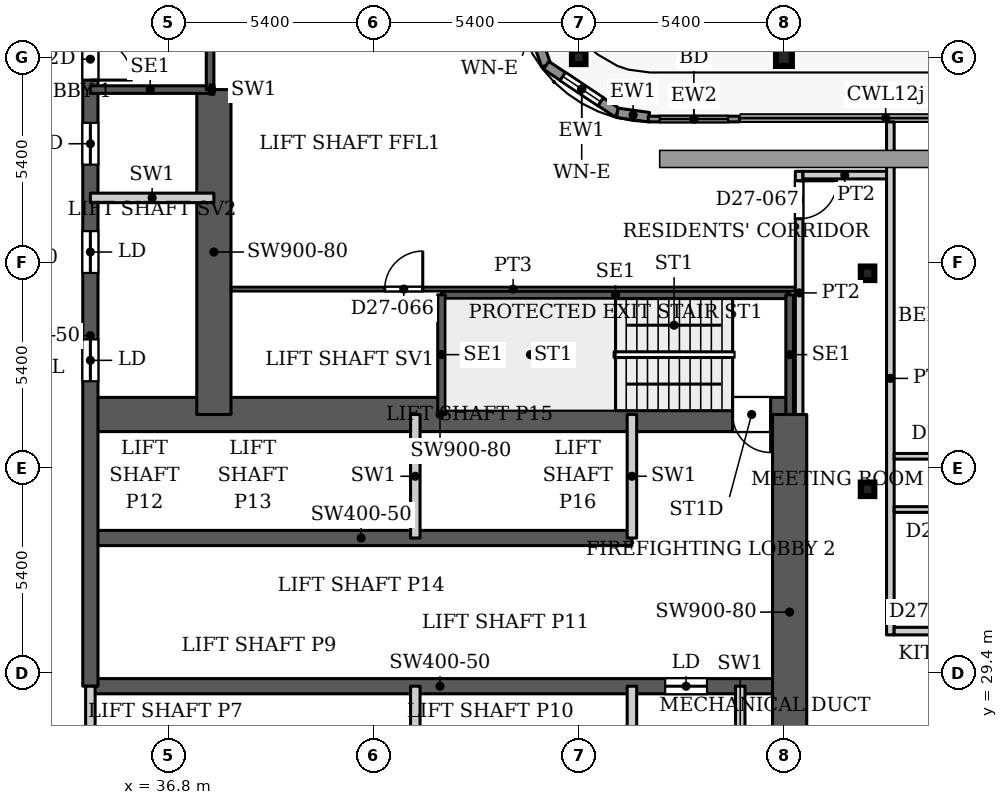
"""IFC4 building model, lengths in metres.
Left out: names, types, materials, properties, quantities, classifications, styles, units other than length and angle.
Written with IfcOpenShell. Run it as: python <this file> out.ifc"""

import sys

from ifc_helpers import new_model, si_unit, direction, frame, frame_2d, origin, origin_2d, place, context, subcontext, project, spatial, rectangle, hollow_rectangle, i_section, extrude, source, transform, mapped, element, fill, save


model = new_model("IFC4")
c1 = context("Model", 3, precision=1e-05, world=origin(), true_north=direction((0.0, 1.0)))
c2 = subcontext(c1, "Body", "Model", "MODEL_VIEW")
j1 = project(units=[si_unit("LENGTHUNIT", "METRE"), si_unit("PLANEANGLEUNIT", "RADIAN")], contexts=[c1])
p1 = place(None, origin())
s1 = spatial("IfcSite", under=j1, at=p1, CompositionType="ELEMENT")
p2 = place(p1, origin())
s2 = spatial("IfcBuilding", under=s1, at=p2, CompositionType="ELEMENT")
p3 = place(p2, frame((0.0, 0.0, 121.4)))
s3 = spatial("IfcBuildingStorey", under=s2, at=p3, CompositionType="ELEMENT", Elevation=121.4)
p4 = place(p3, frame((53.0, 45.6, 0.0), z_axis=(0.0, 0.0, 1.0), x_axis=(1.0, 0.0, 0.0)))
e1 = element("IfcColumn", 1, at=p4, inside=s3, PredefinedType="COLUMN", context=c2, shape_type="SweptSolid", body=[
    extrude(i_section(OverallWidth=0.418, OverallDepth=0.455, WebThickness=0.042, FlangeThickness=0.068, FilletRadius=0.014, at=origin_2d()), origin(), (0.0, 0.0, 1.0), 3.9),
])
for number, where, z_axis, x_axis in (
    (2, (55.2, 34.232, 0.0), (0.0, 0.0, 1.0), (1.0, 0.0, 0.0)),
    (3, (55.2, 39.916, 0.0), (0.0, 0.0, 1.0), (1.0, 0.0, 0.0)),
    (4, (47.6, 45.6, 0.0), (0.0, 0.0, 1.0), (1.0, 0.0, 0.0)),
):
    element("IfcColumn", number, at=place(p3, frame(where, z_axis=z_axis, x_axis=x_axis)), inside=s3, PredefinedType="COLUMN", context=c2, shape_type="SweptSolid", body=[
        extrude(hollow_rectangle(XDim=0.356, YDim=0.356, WallThickness=0.016, InnerFilletRadius=0.016, OuterFilletRadius=0.032, at=origin_2d()), origin(), (0.0, 0.0, 1.0), 3.9),
    ])
p5 = place(p3, frame((34.75, 29.05, 0.0), z_axis=(0.0, 0.0, 1.0), x_axis=(1.0, 0.0, 0.0)))
e5 = element("IfcWall", 5, at=p5, inside=s3, PredefinedType="SHEAR", context=c2, shape_type="SweptSolid", body=[
    extrude(rectangle(XDim=18.4, YDim=0.4, at=frame_2d((9.2, 0.0))), origin(), (0.0, 0.0, 1.0), 3.9),
])
p6 = place(p5, frame((15.125, 0.0, 0.0)))
e6 = element("IfcOpeningElement", 6, at=p6, cuts=e5, PredefinedType="OPENING", context=c2, shape_type="SweptSolid", body=[
    extrude(rectangle(XDim=1.1, YDim=2.2, at=frame_2d((0.55, 1.1))), frame((0.0, 0.21, 0.0), z_axis=(0.0, -1.0, 0.0), x_axis=(1.0, 0.0, 0.0)), (0.0, 0.0, 1.0), 0.42),
])
p7 = place(p3, frame((34.75, 32.95, 0.0), z_axis=(0.0, 0.0, 1.0), x_axis=(1.0, 0.0, 0.0)))
e7 = element("IfcWall", 7, at=p7, inside=s3, PredefinedType="SHEAR", context=c2, shape_type="SweptSolid", body=[
    extrude(rectangle(XDim=14.25, YDim=0.4, at=frame_2d((7.125, 0.0))), origin(), (0.0, 0.0, 1.0), 3.9),
])
p8 = place(p3, frame((34.75, 36.2, 0.0), z_axis=(0.0, 0.0, 1.0), x_axis=(1.0, 0.0, 0.0)))
e8 = element("IfcWall", 8, at=p8, inside=s3, PredefinedType="SHEAR", context=c2, shape_type="SweptSolid", body=[
    extrude(rectangle(XDim=18.4, YDim=0.9, at=frame_2d((9.2, 0.0))), origin(), (0.0, 0.0, 1.0), 3.9),
])
p9 = place(p8, frame((16.9, 0.0, 0.0)))
e9 = element("IfcOpeningElement", 9, at=p9, cuts=e8, PredefinedType="OPENING", context=c2, shape_type="SweptSolid", body=[
    extrude(rectangle(XDim=1.0, YDim=2.2, at=frame_2d((0.5, 1.1))), frame((0.0, 0.46, 0.0), z_axis=(0.0, -1.0, 0.0), x_axis=(1.0, 0.0, 0.0)), (0.0, 0.0, 1.0), 0.92),
])
p10 = place(p3, frame((34.75, 29.05, 0.0), z_axis=(0.0, 0.0, 1.0), x_axis=(0.0, 1.0, 0.0)))
e10 = element("IfcWall", 10, at=p10, inside=s3, PredefinedType="SHEAR", context=c2, shape_type="SweptSolid", body=[
    extrude(rectangle(XDim=18.45, YDim=0.4, at=frame_2d((9.225, 0.0))), origin(), (0.0, 0.0, 1.0), 3.9),
])
p11 = place(p10, frame((8.025, 0.0, 0.0)))
e11 = element("IfcOpeningElement", 11, at=p11, cuts=e10, PredefinedType="OPENING", context=c2, shape_type="SweptSolid", body=[
    extrude(rectangle(XDim=1.1, YDim=2.2, at=frame_2d((0.55, 1.1))), frame((0.0, 0.21, 0.0), z_axis=(0.0, -1.0, 0.0), x_axis=(1.0, 0.0, 0.0)), (0.0, 0.0, 1.0), 0.42),
])
p12 = place(p10, frame((10.875, 0.0, 0.0)))
e12 = element("IfcOpeningElement", 12, at=p12, cuts=e10, PredefinedType="OPENING", context=c2, shape_type="SweptSolid", body=[
    extrude(rectangle(XDim=1.1, YDim=2.2, at=frame_2d((0.55, 1.1))), frame((0.0, 0.21, 0.0), z_axis=(0.0, -1.0, 0.0), x_axis=(1.0, 0.0, 0.0)), (0.0, 0.0, 1.0), 0.42),
])
p13 = place(p10, frame((13.725, 0.0, 0.0)))
e13 = element("IfcOpeningElement", 13, at=p13, cuts=e10, PredefinedType="OPENING", context=c2, shape_type="SweptSolid", body=[
    extrude(rectangle(XDim=1.1, YDim=2.2, at=frame_2d((0.55, 1.1))), frame((0.0, 0.21, 0.0), z_axis=(0.0, -1.0, 0.0), x_axis=(1.0, 0.0, 0.0)), (0.0, 0.0, 1.0), 0.42),
])
p14 = place(p10, frame((15.95, 0.0, 0.0)))
e14 = element("IfcOpeningElement", 14, at=p14, cuts=e10, PredefinedType="OPENING", context=c2, shape_type="SweptSolid", body=[
    extrude(rectangle(XDim=1.1, YDim=2.2, at=frame_2d((0.55, 1.1))), frame((0.0, 0.21, 0.0), z_axis=(0.0, -1.0, 0.0), x_axis=(1.0, 0.0, 0.0)), (0.0, 0.0, 1.0), 0.42),
])
p15 = place(p3, frame((38.0, 36.2, 0.0), z_axis=(0.0, 0.0, 1.0), x_axis=(0.0, 1.0, 0.0)))
e15 = element("IfcWall", 15, at=p15, inside=s3, PredefinedType="SHEAR", context=c2, shape_type="SweptSolid", body=[
    extrude(rectangle(XDim=8.55, YDim=0.9, at=frame_2d((4.275, 0.0))), origin(), (0.0, 0.0, 1.0), 3.9),
])
p16 = place(p3, frame((53.15, 25.8, 0.0), z_axis=(0.0, 0.0, 1.0), x_axis=(0.0, 1.0, 0.0)))
e16 = element("IfcWall", 16, at=p16, inside=s3, PredefinedType="SHEAR", context=c2, shape_type="SweptSolid", body=[
    extrude(rectangle(XDim=10.4, YDim=0.9, at=frame_2d((5.2, 0.0))), origin(), (0.0, 0.0, 1.0), 3.9),
])
p17 = place(p3, frame((46.018, 47.471, 0.0), z_axis=(0.0, 0.0, 1.0), x_axis=(0.328791208903, -0.944402637093, 0.0)))
e17 = element("IfcWall", 17, at=p17, inside=s3, PredefinedType="SOLIDWALL", context=c2, shape_type="SweptSolid", body=[
    extrude(rectangle(XDim=2.205, YDim=0.25, at=frame_2d((1.102, 0.0))), origin(), (0.0, 0.0, 1.0), 3.75),
])
p18 = place(p17, frame((0.503, 0.0, 0.6)))
e18 = element("IfcOpeningElement", 18, at=p18, cuts=e17, PredefinedType="OPENING", context=c2, shape_type="SweptSolid", body=[
    extrude(rectangle(XDim=1.2, YDim=2.1, at=frame_2d((0.6, 1.05))), frame((0.0, 0.135, 0.0), z_axis=(0.0, -1.0, 0.0), x_axis=(1.0, 0.0, 0.0)), (0.0, 0.0, 1.0), 0.27),
])
p19 = place(p3, frame((46.743, 45.389, 0.0), z_axis=(0.0, 0.0, 1.0), x_axis=(0.831449265529, -0.555600682912, 0.0)))
e19 = element("IfcWall", 19, at=p19, inside=s3, PredefinedType="SOLIDWALL", context=c2, shape_type="SweptSolid", body=[
    extrude(rectangle(XDim=2.251, YDim=0.25, at=frame_2d((1.126, 0.0))), origin(), (0.0, 0.0, 1.0), 3.75),
])
p20 = place(p19, frame((0.525, 0.0, 0.6)))
e20 = element("IfcOpeningElement", 20, at=p20, cuts=e19, PredefinedType="OPENING", context=c2, shape_type="SweptSolid", body=[
    extrude(rectangle(XDim=1.2, YDim=2.1, at=frame_2d((0.6, 1.05))), frame((0.0, 0.135, 0.0), z_axis=(0.0, -1.0, 0.0), x_axis=(1.0, 0.0, 0.0)), (0.0, 0.0, 1.0), 0.27),
])
p21 = place(p3, frame((48.615, 44.138, 0.0), z_axis=(0.0, 0.0, 1.0), x_axis=(0.990741504246, -0.135761819977, 0.0)))
e21 = element("IfcWall", 21, at=p21, inside=s3, PredefinedType="SOLIDWALL", context=c2, shape_type="SweptSolid", body=[
    extrude(rectangle(XDim=0.84, YDim=0.25, at=frame_2d((0.42, 0.0))), origin(), (0.0, 0.0, 1.0), 3.75),
])
p22 = place(p3, frame((49.43, 43.975, 0.0), z_axis=(0.0, 0.0, 1.0), x_axis=(1.0, 0.0, 0.0)))
e22 = element("IfcWall", 22, at=p22, inside=s3, PredefinedType="SOLIDWALL", context=c2, shape_type="SweptSolid", body=[
    extrude(rectangle(XDim=2.4, YDim=0.15, at=frame_2d((1.2, 0.0))), origin(), (0.0, 0.0, 1.0), 3.75),
])
p23 = place(p22, frame((0.3, 0.0, 0.0)))
e23 = element("IfcOpeningElement", 23, at=p23, cuts=e22, PredefinedType="OPENING", context=c2, shape_type="SweptSolid", body=[
    extrude(rectangle(XDim=1.8, YDim=2.4, at=frame_2d((0.9, 1.2))), frame((0.0, 0.085, 0.0), z_axis=(0.0, -1.0, 0.0), x_axis=(1.0, 0.0, 0.0)), (0.0, 0.0, 1.0), 0.17),
])
p24 = place(p3, frame((43.99, 39.35, 0.0), z_axis=(0.0, 0.0, 1.0), x_axis=(1.0, 0.0, 0.0)))
e24 = element("IfcWall", 24, at=p24, inside=s3, PredefinedType="SHEAR", context=c2, shape_type="SweptSolid", body=[
    extrude(rectangle(XDim=9.16, YDim=0.2, at=frame_2d((4.58, 0.0))), origin(), (0.0, 0.0, 1.0), 3.9),
])
for number, where, z_axis, x_axis in (
    (25, (43.99, 36.2, 0.0), (0.0, 0.0, 1.0), (0.0, 1.0, 0.0)),
    (26, (53.15, 36.2, 0.0), (0.0, 0.0, 1.0), (0.0, 1.0, 0.0)),
):
    element("IfcWall", number, at=place(p3, frame(where, z_axis=z_axis, x_axis=x_axis)), inside=s3, PredefinedType="SHEAR", context=c2, shape_type="SweptSolid", body=[
        extrude(rectangle(XDim=3.15, YDim=0.2, at=frame_2d((1.575, 0.0))), origin(), (0.0, 0.0, 1.0), 3.9),
    ])
p25 = place(p3, frame((34.75, 44.75, 0.0), z_axis=(0.0, 0.0, 1.0), x_axis=(1.0, 0.0, 0.0)))
e27 = element("IfcWall", 27, at=p25, inside=s3, PredefinedType="SHEAR", context=c2, shape_type="SweptSolid", body=[
    extrude(rectangle(XDim=3.15, YDim=0.2, at=frame_2d((1.575, 0.0))), origin(), (0.0, 0.0, 1.0), 3.9),
])
p26 = place(p3, frame((37.9, 44.75, 0.0), z_axis=(0.0, 0.0, 1.0), x_axis=(0.0, 1.0, 0.0)))
e28 = element("IfcWall", 28, at=p26, inside=s3, PredefinedType="SHEAR", context=c2, shape_type="SweptSolid", body=[
    extrude(rectangle(XDim=9.16, YDim=0.2, at=frame_2d((4.58, 0.0))), origin(), (0.0, 0.0, 1.0), 3.9),
])
for number, where, z_axis, x_axis in (
    (29, (34.75, 25.8, 0.0), (0.0, 0.0, 1.0), (0.0, 1.0, 0.0)),
    (30, (43.3, 25.8, 0.0), (0.0, 0.0, 1.0), (0.0, 1.0, 0.0)),
    (31, (43.3, 32.95, 0.0), (0.0, 0.0, 1.0), (0.0, 1.0, 0.0)),
    (32, (49.0, 25.8, 0.0), (0.0, 0.0, 1.0), (0.0, 1.0, 0.0)),
    (33, (49.0, 32.95, 0.0), (0.0, 0.0, 1.0), (0.0, 1.0, 0.0)),
    (34, (51.85, 25.8, 0.0), (0.0, 0.0, 1.0), (0.0, 1.0, 0.0)),
    (35, (34.75, 41.9, 0.0), (0.0, 0.0, 1.0), (1.0, 0.0, 0.0)),
):
    element("IfcWall", number, at=place(p3, frame(where, z_axis=z_axis, x_axis=x_axis)), inside=s3, PredefinedType="PARTITIONING", context=c2, shape_type="SweptSolid", body=[
        extrude(rectangle(XDim=3.25, YDim=0.25, at=frame_2d((1.625, 0.0))), origin(), (0.0, 0.0, 1.0), 3.9),
    ])
p27 = place(p3, frame((37.9, 44.75, 0.0), z_axis=(0.0, 0.0, 1.0), x_axis=(1.0, 0.0, 0.0)))
e36 = element("IfcWall", 36, at=p27, inside=s3, PredefinedType="PARTITIONING", context=c2, shape_type="SweptSolid", body=[
    extrude(rectangle(XDim=0.1, YDim=0.25, at=frame_2d((0.05, 0.0))), origin(), (0.0, 0.0, 1.0), 3.9),
])
p28 = place(p3, frame((38.449, 39.5, 0.0), z_axis=(0.0, 0.0, 1.0), x_axis=(1.0, 0.0, 0.0)))
e37 = element("IfcWall", 37, at=p28, inside=s3, PredefinedType="PARTITIONING", context=c2, shape_type="SweptSolid", body=[
    extrude(rectangle(XDim=14.851, YDim=0.1, at=frame_2d((7.426, 0.0))), origin(), (0.0, 0.0, 1.0), 3.6),
])
p29 = place(p28, frame((4.047, 0.0, 0.0)))
e38 = element("IfcOpeningElement", 38, at=p29, cuts=e37, PredefinedType="OPENING", context=c2, shape_type="SweptSolid", body=[
    extrude(rectangle(XDim=1.0, YDim=2.1, at=frame_2d((0.5, 1.05))), frame((0.0, 0.06, 0.0), z_axis=(0.0, -1.0, 0.0), x_axis=(1.0, 0.0, 0.0)), (0.0, 0.0, 1.0), 0.12),
])
p30 = place(p3, frame((53.4, 36.199, 0.0), z_axis=(0.0, 0.0, 1.0), x_axis=(0.0, 1.0, 0.0)))
e39 = element("IfcWall", 39, at=p30, inside=s3, PredefinedType="PARTITIONING", context=c2, shape_type="SweptSolid", body=[
    extrude(rectangle(XDim=6.401, YDim=0.2, at=frame_2d((3.201, 0.0))), origin(), (0.0, 0.0, 1.0), 3.6),
])
p31 = place(p30, frame((5.151, 0.0, 0.0)))
e40 = element("IfcOpeningElement", 40, at=p31, cuts=e39, PredefinedType="OPENING", context=c2, shape_type="SweptSolid", body=[
    extrude(rectangle(XDim=1.0, YDim=2.1, at=frame_2d((0.5, 1.05))), frame((0.0, 0.11, 0.0), z_axis=(0.0, -1.0, 0.0), x_axis=(1.0, 0.0, 0.0)), (0.0, 0.0, 1.0), 0.22),
])
p32 = place(p3, frame((53.5, 42.5, 0.0), z_axis=(0.0, 0.0, 1.0), x_axis=(1.0, 0.0, 0.0)))
e41 = element("IfcWall", 41, at=p32, inside=s3, PredefinedType="PARTITIONING", context=c2, shape_type="SweptSolid", body=[
    extrude(rectangle(XDim=2.2, YDim=0.2, at=frame_2d((1.1, 0.0))), origin(), (0.0, 0.0, 1.0), 3.6),
])
p33 = place(p3, frame((55.8, 30.4, 0.0), z_axis=(0.0, 0.0, 1.0), x_axis=(0.0, 1.0, 0.0)))
e42 = element("IfcWall", 42, at=p33, inside=s3, PredefinedType="PARTITIONING", context=c2, shape_type="SweptSolid", body=[
    extrude(rectangle(XDim=13.5, YDim=0.2, at=frame_2d((6.75, 0.0))), origin(), (0.0, 0.0, 1.0), 3.6),
])
p34 = place(p3, frame((55.9, 30.5, 0.0), z_axis=(0.0, 0.0, 1.0), x_axis=(1.0, 0.0, 0.0)))
e43 = element("IfcWall", 43, at=p34, inside=s3, PredefinedType="PARTITIONING", context=c2, shape_type="SweptSolid", body=[
    extrude(rectangle(XDim=42.2, YDim=0.2, at=frame_2d((21.1, 0.0))), origin(), (0.0, 0.0, 1.0), 3.6),
])
p35 = place(p34, frame((4.8, 0.0, 0.0)))
e44 = element("IfcOpeningElement", 44, at=p35, cuts=e43, PredefinedType="OPENING", context=c2, shape_type="SweptSolid", body=[
    extrude(rectangle(XDim=1.0, YDim=2.1, at=frame_2d((0.5, 1.05))), frame((0.0, 0.11, 0.0), z_axis=(0.0, -1.0, 0.0), x_axis=(1.0, 0.0, 0.0)), (0.0, 0.0, 1.0), 0.22),
])
p36 = place(p34, frame((11.1, 0.0, 0.0)))
e45 = element("IfcOpeningElement", 45, at=p36, cuts=e43, PredefinedType="OPENING", context=c2, shape_type="SweptSolid", body=[
    extrude(rectangle(XDim=1.0, YDim=2.1, at=frame_2d((0.5, 1.05))), frame((0.0, 0.11, 0.0), z_axis=(0.0, -1.0, 0.0), x_axis=(1.0, 0.0, 0.0)), (0.0, 0.0, 1.0), 0.22),
])
p37 = place(p34, frame((39.0, 0.0, 0.0)))
e46 = element("IfcOpeningElement", 46, at=p37, cuts=e43, PredefinedType="OPENING", context=c2, shape_type="SweptSolid", body=[
    extrude(rectangle(XDim=1.0, YDim=2.1, at=frame_2d((0.5, 1.05))), frame((0.0, 0.11, 0.0), z_axis=(0.0, -1.0, 0.0), x_axis=(1.0, 0.0, 0.0)), (0.0, 0.0, 1.0), 0.22),
])
p38 = place(p3, frame((55.9, 33.7, 0.0), z_axis=(0.0, 0.0, 1.0), x_axis=(1.0, 0.0, 0.0)))
e47 = element("IfcWall", 47, at=p38, inside=s3, PredefinedType="PARTITIONING", context=c2, shape_type="SweptSolid", body=[
    extrude(rectangle(XDim=4.475, YDim=0.15, at=frame_2d((2.238, 0.0))), origin(), (0.0, 0.0, 1.0), 3.6),
])
p39 = place(p38, frame((0.95, 0.0, 0.0)))
e48 = element("IfcOpeningElement", 48, at=p39, cuts=e47, PredefinedType="OPENING", context=c2, shape_type="SweptSolid", body=[
    extrude(rectangle(XDim=0.9, YDim=2.1, at=frame_2d((0.45, 1.05))), frame((0.0, 0.085, 0.0), z_axis=(0.0, -1.0, 0.0), x_axis=(1.0, 0.0, 0.0)), (0.0, 0.0, 1.0), 0.17),
])
p40 = place(p38, frame((3.25, 0.0, 0.0)))
e49 = element("IfcOpeningElement", 49, at=p40, cuts=e47, PredefinedType="OPENING", context=c2, shape_type="SweptSolid", body=[
    extrude(rectangle(XDim=0.8, YDim=2.1, at=frame_2d((0.4, 1.05))), frame((0.0, 0.085, 0.0), z_axis=(0.0, -1.0, 0.0), x_axis=(1.0, 0.0, 0.0)), (0.0, 0.0, 1.0), 0.17),
])
p41 = place(p3, frame((55.9, 35.1, 0.0), z_axis=(0.0, 0.0, 1.0), x_axis=(1.0, 0.0, 0.0)))
e50 = element("IfcWall", 50, at=p41, inside=s3, PredefinedType="PARTITIONING", context=c2, shape_type="SweptSolid", body=[
    extrude(rectangle(XDim=10.6, YDim=0.15, at=frame_2d((5.3, 0.0))), origin(), (0.0, 0.0, 1.0), 3.6),
])
p42 = place(p41, frame((1.1, 0.0, 0.0)))
e51 = element("IfcOpeningElement", 51, at=p42, cuts=e50, PredefinedType="OPENING", context=c2, shape_type="SweptSolid", body=[
    extrude(rectangle(XDim=0.9, YDim=2.1, at=frame_2d((0.45, 1.05))), frame((0.0, 0.085, 0.0), z_axis=(0.0, -1.0, 0.0), x_axis=(1.0, 0.0, 0.0)), (0.0, 0.0, 1.0), 0.17),
])
p43 = place(p41, frame((8.25, 0.0, 0.0)))
e52 = element("IfcOpeningElement", 52, at=p43, cuts=e50, PredefinedType="OPENING", context=c2, shape_type="SweptSolid", body=[
    extrude(rectangle(XDim=1.0, YDim=2.1, at=frame_2d((0.5, 1.05))), frame((0.0, 0.085, 0.0), z_axis=(0.0, -1.0, 0.0), x_axis=(1.0, 0.0, 0.0)), (0.0, 0.0, 1.0), 0.17),
])
p44 = place(p41, frame((5.6, 0.0, 0.0)))
e53 = element("IfcOpeningElement", 53, at=p44, cuts=e50, PredefinedType="OPENING", context=c2, shape_type="SweptSolid", body=[
    extrude(rectangle(XDim=0.9, YDim=2.1, at=frame_2d((0.45, 1.05))), frame((0.0, 0.085, 0.0), z_axis=(0.0, -1.0, 0.0), x_axis=(1.0, 0.0, 0.0)), (0.0, 0.0, 1.0), 0.17),
])
m1 = source(origin(), c2, "Body", "SweptSolid", [
    extrude(rectangle(XDim=1.2, YDim=2.1, at=frame_2d((0.6, 1.05))), frame((0.0, 0.03, 0.0), z_axis=(0.0, -1.0, 0.0), x_axis=(1.0, 0.0, 0.0)), (0.0, 0.0, 1.0), 0.06),
])
p45 = place(p20, origin())
e54 = element("IfcWindow", 54, at=p45, inside=s3, PartitioningType="SINGLE_PANEL", PredefinedType="WINDOW", context=c2, shape_type="MappedRepresentation", body=[
    mapped(m1, transform((0.0, 0.0, 0.0), x_axis=(1.0, 0.0, 0.0), y_axis=(0.0, 1.0, 0.0), z_axis=(0.0, 0.0, 1.0), scale=1.0)),
])
fill(e20, e54)
m2 = source(origin(), c2, "Body", "SweptSolid", [
    extrude(rectangle(XDim=1.8, YDim=2.4, at=frame_2d((0.9, 1.2))), frame((0.0, 0.025, 0.0), z_axis=(0.0, -1.0, 0.0), x_axis=(1.0, 0.0, 0.0)), (0.0, 0.0, 1.0), 0.05),
])
p46 = place(p23, origin())
e55 = element("IfcDoor", 55, at=p46, inside=s3, OperationType="SLIDING_TO_LEFT", PredefinedType="DOOR", context=c2, shape_type="MappedRepresentation", body=[
    mapped(m2, transform((0.0, 0.0, 0.0), x_axis=(1.0, 0.0, 0.0), y_axis=(0.0, 1.0, 0.0), z_axis=(0.0, 0.0, 1.0), scale=1.0)),
])
fill(e23, e55)
m3 = source(origin(), c2, "Body", "SweptSolid", [
    extrude(rectangle(XDim=1.1, YDim=2.2, at=frame_2d((0.55, 1.1))), frame((0.0, 0.025, 0.0), z_axis=(0.0, -1.0, 0.0), x_axis=(1.0, 0.0, 0.0)), (0.0, 0.0, 1.0), 0.05),
])
p47 = place(p11, origin())
e56 = element("IfcDoor", 56, at=p47, inside=s3, OperationType="SLIDING_TO_LEFT", PredefinedType="DOOR", context=c2, shape_type="MappedRepresentation", body=[
    mapped(m3, transform((0.0, 0.0, 0.0), x_axis=(1.0, 0.0, 0.0), y_axis=(0.0, 1.0, 0.0), z_axis=(0.0, 0.0, 1.0), scale=1.0)),
])
fill(e11, e56)
p48 = place(p12, origin())
e57 = element("IfcDoor", 57, at=p48, inside=s3, OperationType="SLIDING_TO_LEFT", PredefinedType="DOOR", context=c2, shape_type="MappedRepresentation", body=[
    mapped(m3, transform((0.0, 0.0, 0.0), x_axis=(1.0, 0.0, 0.0), y_axis=(0.0, 1.0, 0.0), z_axis=(0.0, 0.0, 1.0), scale=1.0)),
])
fill(e12, e57)
p49 = place(p13, origin())
e58 = element("IfcDoor", 58, at=p49, inside=s3, OperationType="SLIDING_TO_LEFT", PredefinedType="DOOR", context=c2, shape_type="MappedRepresentation", body=[
    mapped(m3, transform((0.0, 0.0, 0.0), x_axis=(1.0, 0.0, 0.0), y_axis=(0.0, 1.0, 0.0), z_axis=(0.0, 0.0, 1.0), scale=1.0)),
])
fill(e13, e58)
p50 = place(p6, origin())
e59 = element("IfcDoor", 59, at=p50, inside=s3, OperationType="SLIDING_TO_LEFT", PredefinedType="DOOR", context=c2, shape_type="MappedRepresentation", body=[
    mapped(m3, transform((0.0, 0.0, 0.0), x_axis=(1.0, 0.0, 0.0), y_axis=(0.0, 1.0, 0.0), z_axis=(0.0, 0.0, 1.0), scale=1.0)),
])
fill(e6, e59)
m4 = source(origin(), c2, "Body", "SweptSolid", [
    extrude(rectangle(XDim=1.0, YDim=2.2, at=frame_2d((0.5, 1.1))), frame((0.0, 0.025, 0.0), z_axis=(0.0, -1.0, 0.0), x_axis=(1.0, 0.0, 0.0)), (0.0, 0.0, 1.0), 0.05),
])
p51 = place(p9, origin())
e60 = element("IfcDoor", 60, at=p51, inside=s3, OperationType="SINGLE_SWING_RIGHT", PredefinedType="DOOR", context=c2, shape_type="MappedRepresentation", body=[
    mapped(m4, transform((0.0, 0.0, 0.0), x_axis=(1.0, 0.0, 0.0), y_axis=(0.0, 1.0, 0.0), z_axis=(0.0, 0.0, 1.0), scale=1.0)),
])
fill(e9, e60)
m5 = source(origin(), c2, "Body", "SweptSolid", [
    extrude(rectangle(XDim=1.1, YDim=2.2, at=frame_2d((0.55, 1.1))), frame((0.0, 0.025, 0.0), z_axis=(0.0, -1.0, 0.0), x_axis=(1.0, 0.0, 0.0)), (0.0, 0.0, 1.0), 0.05),
])
p52 = place(p14, origin())
e61 = element("IfcDoor", 61, at=p52, inside=s3, OperationType="SINGLE_SWING_RIGHT", PredefinedType="DOOR", context=c2, shape_type="MappedRepresentation", body=[
    mapped(m5, transform((0.0, 0.0, 0.0), x_axis=(1.0, 0.0, 0.0), y_axis=(0.0, 1.0, 0.0), z_axis=(0.0, 0.0, 1.0), scale=1.0)),
])
fill(e14, e61)
m6 = source(origin(), c2, "Body", "SweptSolid", [
    extrude(rectangle(XDim=1.0, YDim=2.1, at=frame_2d((0.5, 1.05))), frame((0.0, 0.025, 0.0), z_axis=(0.0, -1.0, 0.0), x_axis=(1.0, 0.0, 0.0)), (0.0, 0.0, 1.0), 0.05),
])
p53 = place(p29, origin())
e62 = element("IfcDoor", 62, at=p53, inside=s3, OperationType="SINGLE_SWING_LEFT", PredefinedType="DOOR", context=c2, shape_type="MappedRepresentation", body=[
    mapped(m6, transform((0.0, 0.0, 0.0), x_axis=(1.0, 0.0, 0.0), y_axis=(0.0, 1.0, 0.0), z_axis=(0.0, 0.0, 1.0), scale=1.0)),
])
fill(e38, e62)
m7 = source(origin(), c2, "Body", "SweptSolid", [
    extrude(rectangle(XDim=1.0, YDim=2.1, at=frame_2d((0.5, 1.05))), frame((0.0, 0.025, 0.0), z_axis=(0.0, -1.0, 0.0), x_axis=(1.0, 0.0, 0.0)), (0.0, 0.0, 1.0), 0.05),
])
p54 = place(p31, origin())
e63 = element("IfcDoor", 63, at=p54, inside=s3, OperationType="SINGLE_SWING_RIGHT", PredefinedType="DOOR", context=c2, shape_type="MappedRepresentation", body=[
    mapped(m7, transform((0.0, 0.0, 0.0), x_axis=(1.0, 0.0, 0.0), y_axis=(0.0, 1.0, 0.0), z_axis=(0.0, 0.0, 1.0), scale=1.0)),
])
fill(e40, e63)
save(model, sys.argv[1])
